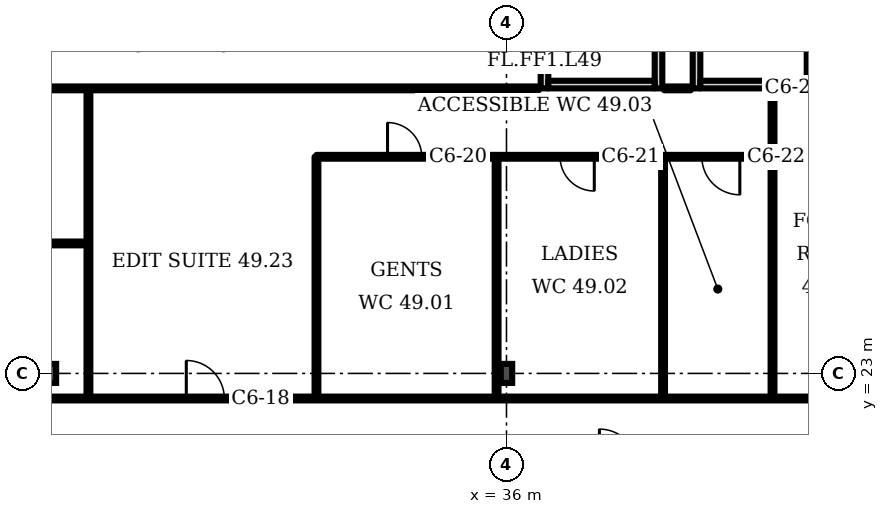
"""IFC4 building model, lengths in metres.
Left out: names, types, materials, properties, quantities, classifications, styles, units other than length and angle.
Written with IfcOpenShell. Run it as: python <this file> out.ifc"""

import sys

from ifc_helpers import new_model, si_unit, direction, frame, frame_2d, origin, origin_2d, place, context, subcontext, project, spatial, rectangle, i_section, extrude, element, fill, save


model = new_model("IFC4")
c1 = context("Model", 3, precision=1e-05, world=origin(), true_north=direction((0.0, 1.0)))
c2 = subcontext(c1, "Body", "Model", "MODEL_VIEW")
j1 = project(units=[si_unit("LENGTHUNIT", "METRE"), si_unit("PLANEANGLEUNIT", "RADIAN")], contexts=[c1])
p1 = place(None, origin())
s1 = spatial("IfcSite", under=j1, at=p1, CompositionType="ELEMENT")
p2 = place(p1, origin())
s2 = spatial("IfcBuilding", under=s1, at=p2, CompositionType="ELEMENT")
p3 = place(p2, frame((0.0, 0.0, 198.7)))
s3 = spatial("IfcBuildingStorey", under=s2, at=p3, CompositionType="ELEMENT", Elevation=198.7)
for number, where, z_axis, x_axis in (
    (1, (24.0, 23.0, 0.0), (0.0, 0.0, 1.0), (1.0, 0.0, 0.0)),
    (2, (36.0, 23.0, 0.0), (0.0, 0.0, 1.0), (1.0, 0.0, 0.0)),
):
    element("IfcColumn", number, at=place(p3, frame(where, z_axis=z_axis, x_axis=x_axis)), inside=s3, PredefinedType="COLUMN", context=c2, shape_type="SweptSolid", body=[
        extrude(i_section(OverallWidth=0.3, OverallDepth=0.5, WebThickness=0.014, FlangeThickness=0.028, FilletRadius=0.027, at=origin_2d()), origin(), (0.0, 0.0, 1.0), 3.6),
    ])
p4 = place(p3, frame((37.0, 30.5, 0.0), z_axis=(0.0, 0.0, 1.0), x_axis=(0.0, 1.0, 0.0)))
e3 = element("IfcWall", 3, at=p4, inside=s3, PredefinedType="PARTITIONING", context=c2, shape_type="SweptSolid", body=[
    extrude(rectangle(XDim=3.5, YDim=0.2, at=frame_2d((1.75, 0.0))), origin(), (0.0, 0.0, 1.0), 3.15),
])
p5 = place(p4, frame((1.2, 0.0, 0.0)))
e4 = element("IfcOpeningElement", 4, at=p5, cuts=e3, PredefinedType="OPENING", context=c2, shape_type="SweptSolid", body=[
    extrude(rectangle(XDim=1.1, YDim=2.1, at=frame_2d((0.55, 1.05))), frame((0.0, 0.11, 0.0), z_axis=(0.0, -1.0, 0.0), x_axis=(1.0, 0.0, 0.0)), (0.0, 0.0, 1.0), 0.22),
])
p6 = place(p3, frame((40.0, 30.5, 0.0), z_axis=(0.0, 0.0, 1.0), x_axis=(0.0, 1.0, 0.0)))
e5 = element("IfcWall", 5, at=p6, inside=s3, PredefinedType="PARTITIONING", context=c2, shape_type="SweptSolid", body=[
    extrude(rectangle(XDim=3.5, YDim=0.2, at=frame_2d((1.75, 0.0))), origin(), (0.0, 0.0, 1.0), 3.15),
])
p7 = place(p3, frame((37.1, 30.6, 0.0), z_axis=(0.0, 0.0, 1.0), x_axis=(1.0, 0.0, 0.0)))
e6 = element("IfcWall", 6, at=p7, inside=s3, PredefinedType="PARTITIONING", context=c2, shape_type="SweptSolid", body=[
    extrude(rectangle(XDim=2.8, YDim=0.2, at=frame_2d((1.4, 0.0))), origin(), (0.0, 0.0, 1.0), 3.15),
])
p8 = place(p3, frame((41.0, 30.5, 0.0), z_axis=(0.0, 0.0, 1.0), x_axis=(0.0, 1.0, 0.0)))
e7 = element("IfcWall", 7, at=p8, inside=s3, PredefinedType="PARTITIONING", context=c2, shape_type="SweptSolid", body=[
    extrude(rectangle(XDim=3.5, YDim=0.2, at=frame_2d((1.75, 0.0))), origin(), (0.0, 0.0, 1.0), 3.15),
])
p9 = place(p3, frame((44.0, 30.5, 0.0), z_axis=(0.0, 0.0, 1.0), x_axis=(0.0, 1.0, 0.0)))
e8 = element("IfcWall", 8, at=p9, inside=s3, PredefinedType="PARTITIONING", context=c2, shape_type="SweptSolid", body=[
    extrude(rectangle(XDim=3.5, YDim=0.2, at=frame_2d((1.75, 0.0))), origin(), (0.0, 0.0, 1.0), 3.15),
])
p10 = place(p9, frame((1.2, 0.0, 0.0)))
e9 = element("IfcOpeningElement", 9, at=p10, cuts=e8, PredefinedType="OPENING", context=c2, shape_type="SweptSolid", body=[
    extrude(rectangle(XDim=1.1, YDim=2.1, at=frame_2d((0.55, 1.05))), frame((0.0, 0.11, 0.0), z_axis=(0.0, -1.0, 0.0), x_axis=(1.0, 0.0, 0.0)), (0.0, 0.0, 1.0), 0.22),
])
p11 = place(p3, frame((41.1, 30.6, 0.0), z_axis=(0.0, 0.0, 1.0), x_axis=(1.0, 0.0, 0.0)))
e10 = element("IfcWall", 10, at=p11, inside=s3, PredefinedType="PARTITIONING", context=c2, shape_type="SweptSolid", body=[
    extrude(rectangle(XDim=2.8, YDim=0.2, at=frame_2d((1.4, 0.0))), origin(), (0.0, 0.0, 1.0), 3.15),
])
p12 = place(p3, frame((18.2, 26.42, 0.0), z_axis=(0.0, 0.0, 1.0), x_axis=(1.0, 0.0, 0.0)))
e11 = element("IfcWall", 11, at=p12, inside=s3, PredefinedType="PARTITIONING", context=c2, shape_type="SweptSolid", body=[
    extrude(rectangle(XDim=6.8, YDim=0.1, at=frame_2d((3.4, 0.0))), origin(), (0.0, 0.0, 1.0), 3.15),
])
p13 = place(p3, frame((18.2, 30.5, 0.0), z_axis=(0.0, 0.0, 1.0), x_axis=(1.0, 0.0, 0.0)))
e12 = element("IfcWall", 12, at=p13, inside=s3, PredefinedType="PARTITIONING", context=c2, shape_type="SweptSolid", body=[
    extrude(rectangle(XDim=18.65, YDim=0.1, at=frame_2d((9.325, 0.0))), origin(), (0.0, 0.0, 1.0), 3.15),
])
p14 = place(p13, frame((0.74, 0.0, 0.0)))
e13 = element("IfcOpeningElement", 13, at=p14, cuts=e12, PredefinedType="OPENING", context=c2, shape_type="SweptSolid", body=[
    extrude(rectangle(XDim=1.0, YDim=2.1, at=frame_2d((0.5, 1.05))), frame((0.0, 0.06, 0.0), z_axis=(0.0, -1.0, 0.0), x_axis=(1.0, 0.0, 0.0)), (0.0, 0.0, 1.0), 0.12),
])
p15 = place(p3, frame((18.955, 22.34, 0.0), z_axis=(0.0, 0.0, 1.0), x_axis=(1.0, 0.0, 0.0)))
e14 = element("IfcWall", 14, at=p15, inside=s3, PredefinedType="PARTITIONING", context=c2, shape_type="SweptSolid", body=[
    extrude(rectangle(XDim=42.555, YDim=0.1, at=frame_2d((21.277, 0.0))), origin(), (0.0, 0.0, 1.0), 3.15),
])
p16 = place(p15, frame((0.62, 0.0, 0.0)))
e15 = element("IfcOpeningElement", 15, at=p16, cuts=e14, PredefinedType="OPENING", context=c2, shape_type="SweptSolid", body=[
    extrude(rectangle(XDim=1.0, YDim=2.1, at=frame_2d((0.5, 1.05))), frame((0.0, 0.06, 0.0), z_axis=(0.0, -1.0, 0.0), x_axis=(1.0, 0.0, 0.0)), (0.0, 0.0, 1.0), 0.12),
])
p17 = place(p15, frame((8.62, 0.0, 0.0)))
e16 = element("IfcOpeningElement", 16, at=p17, cuts=e14, PredefinedType="OPENING", context=c2, shape_type="SweptSolid", body=[
    extrude(rectangle(XDim=1.0, YDim=2.1, at=frame_2d((0.5, 1.05))), frame((0.0, 0.06, 0.0), z_axis=(0.0, -1.0, 0.0), x_axis=(1.0, 0.0, 0.0)), (0.0, 0.0, 1.0), 0.12),
])
p18 = place(p3, frame((25.0, 22.34, 0.0), z_axis=(0.0, 0.0, 1.0), x_axis=(0.0, 1.0, 0.0)))
e17 = element("IfcWall", 17, at=p18, inside=s3, PredefinedType="PARTITIONING", context=c2, shape_type="SweptSolid", body=[
    extrude(rectangle(XDim=8.16, YDim=0.1, at=frame_2d((4.08, 0.0))), origin(), (0.0, 0.0, 1.0), 3.15),
])
p19 = place(p3, frame((31.0, 22.34, 0.0), z_axis=(0.0, 0.0, 1.0), x_axis=(0.0, 1.0, 0.0)))
e18 = element("IfcWall", 18, at=p19, inside=s3, PredefinedType="PARTITIONING", context=c2, shape_type="SweptSolid", body=[
    extrude(rectangle(XDim=6.36, YDim=0.1, at=frame_2d((3.18, 0.0))), origin(), (0.0, 0.0, 1.0), 3.15),
])
p20 = place(p3, frame((31.0, 28.7, 0.0), z_axis=(0.0, 0.0, 1.0), x_axis=(1.0, 0.0, 0.0)))
e19 = element("IfcWall", 19, at=p20, inside=s3, PredefinedType="PARTITIONING", context=c2, shape_type="SweptSolid", body=[
    extrude(rectangle(XDim=12.0, YDim=0.1, at=frame_2d((6.0, 0.0))), origin(), (0.0, 0.0, 1.0), 3.15),
])
p21 = place(p20, frame((1.87, 0.0, 0.0)))
e20 = element("IfcOpeningElement", 20, at=p21, cuts=e19, PredefinedType="OPENING", context=c2, shape_type="SweptSolid", body=[
    extrude(rectangle(XDim=0.9, YDim=2.1, at=frame_2d((0.45, 1.05))), frame((0.0, 0.06, 0.0), z_axis=(0.0, -1.0, 0.0), x_axis=(1.0, 0.0, 0.0)), (0.0, 0.0, 1.0), 0.12),
])
p22 = place(p20, frame((6.41, 0.0, 0.0)))
e21 = element("IfcOpeningElement", 21, at=p22, cuts=e19, PredefinedType="OPENING", context=c2, shape_type="SweptSolid", body=[
    extrude(rectangle(XDim=0.9, YDim=2.1, at=frame_2d((0.45, 1.05))), frame((0.0, 0.06, 0.0), z_axis=(0.0, -1.0, 0.0), x_axis=(1.0, 0.0, 0.0)), (0.0, 0.0, 1.0), 0.12),
])
p23 = place(p20, frame((10.14, 0.0, 0.0)))
e22 = element("IfcOpeningElement", 22, at=p23, cuts=e19, PredefinedType="OPENING", context=c2, shape_type="SweptSolid", body=[
    extrude(rectangle(XDim=1.0, YDim=2.1, at=frame_2d((0.5, 1.05))), frame((0.0, 0.06, 0.0), z_axis=(0.0, -1.0, 0.0), x_axis=(1.0, 0.0, 0.0)), (0.0, 0.0, 1.0), 0.12),
])
for number, where, z_axis, x_axis in (
    (23, (35.74, 22.34, 0.0), (0.0, 0.0, 1.0), (0.0, 1.0, 0.0)),
    (24, (40.12, 22.34, 0.0), (0.0, 0.0, 1.0), (0.0, 1.0, 0.0)),
):
    element("IfcWall", number, at=place(p3, frame(where, z_axis=z_axis, x_axis=x_axis)), inside=s3, PredefinedType="PARTITIONING", context=c2, shape_type="SweptSolid", body=[
        extrude(rectangle(XDim=6.36, YDim=0.1, at=frame_2d((3.18, 0.0))), origin(), (0.0, 0.0, 1.0), 3.15),
    ])
p24 = place(p3, frame((43.0, 22.34, 0.0), z_axis=(0.0, 0.0, 1.0), x_axis=(0.0, 1.0, 0.0)))
e25 = element("IfcWall", 25, at=p24, inside=s3, PredefinedType="PARTITIONING", context=c2, shape_type="SweptSolid", body=[
    extrude(rectangle(XDim=8.15, YDim=0.1, at=frame_2d((4.075, 0.0))), origin(), (0.0, 0.0, 1.0), 3.15),
])
p25 = place(p3, frame((40.15, 30.5, 0.0), z_axis=(0.0, 0.0, 1.0), x_axis=(1.0, 0.0, 0.0)))
e26 = element("IfcWall", 26, at=p25, inside=s3, PredefinedType="PARTITIONING", context=c2, shape_type="SweptSolid", body=[
    extrude(rectangle(XDim=0.7, YDim=0.1, at=frame_2d((0.35, 0.0))), origin(), (0.0, 0.0, 1.0), 3.15),
])
p26 = place(p17, origin())
e27 = element("IfcDoor", 27, at=p26, inside=s3, OperationType="SINGLE_SWING_LEFT", PredefinedType="DOOR", context=c2, shape_type="SweptSolid", body=[
    extrude(rectangle(XDim=1.0, YDim=2.1, at=frame_2d((0.5, 1.05))), frame((0.0, 0.025, 0.0), z_axis=(0.0, -1.0, 0.0), x_axis=(1.0, 0.0, 0.0)), (0.0, 0.0, 1.0), 0.05),
])
fill(e16, e27)
p27 = place(p21, origin())
e28 = element("IfcDoor", 28, at=p27, inside=s3, OperationType="SINGLE_SWING_LEFT", PredefinedType="DOOR", context=c2, shape_type="SweptSolid", body=[
    extrude(rectangle(XDim=0.9, YDim=2.1, at=frame_2d((0.45, 1.05))), frame((0.0, 0.025, 0.0), z_axis=(0.0, -1.0, 0.0), x_axis=(1.0, 0.0, 0.0)), (0.0, 0.0, 1.0), 0.05),
])
fill(e20, e28)
p28 = place(p22, origin())
e29 = element("IfcDoor", 29, at=p28, inside=s3, OperationType="SINGLE_SWING_RIGHT", PredefinedType="DOOR", context=c2, shape_type="SweptSolid", body=[
    extrude(rectangle(XDim=0.9, YDim=2.1, at=frame_2d((0.45, 1.05))), frame((0.0, 0.025, 0.0), z_axis=(0.0, -1.0, 0.0), x_axis=(1.0, 0.0, 0.0)), (0.0, 0.0, 1.0), 0.05),
])
fill(e21, e29)
p29 = place(p23, origin())
e30 = element("IfcDoor", 30, at=p29, inside=s3, OperationType="SINGLE_SWING_RIGHT", PredefinedType="DOOR", context=c2, shape_type="SweptSolid", body=[
    extrude(rectangle(XDim=1.0, YDim=2.1, at=frame_2d((0.5, 1.05))), frame((0.0, 0.025, 0.0), z_axis=(0.0, -1.0, 0.0), x_axis=(1.0, 0.0, 0.0)), (0.0, 0.0, 1.0), 0.05),
])
fill(e22, e30)
save(model, sys.argv[1])
